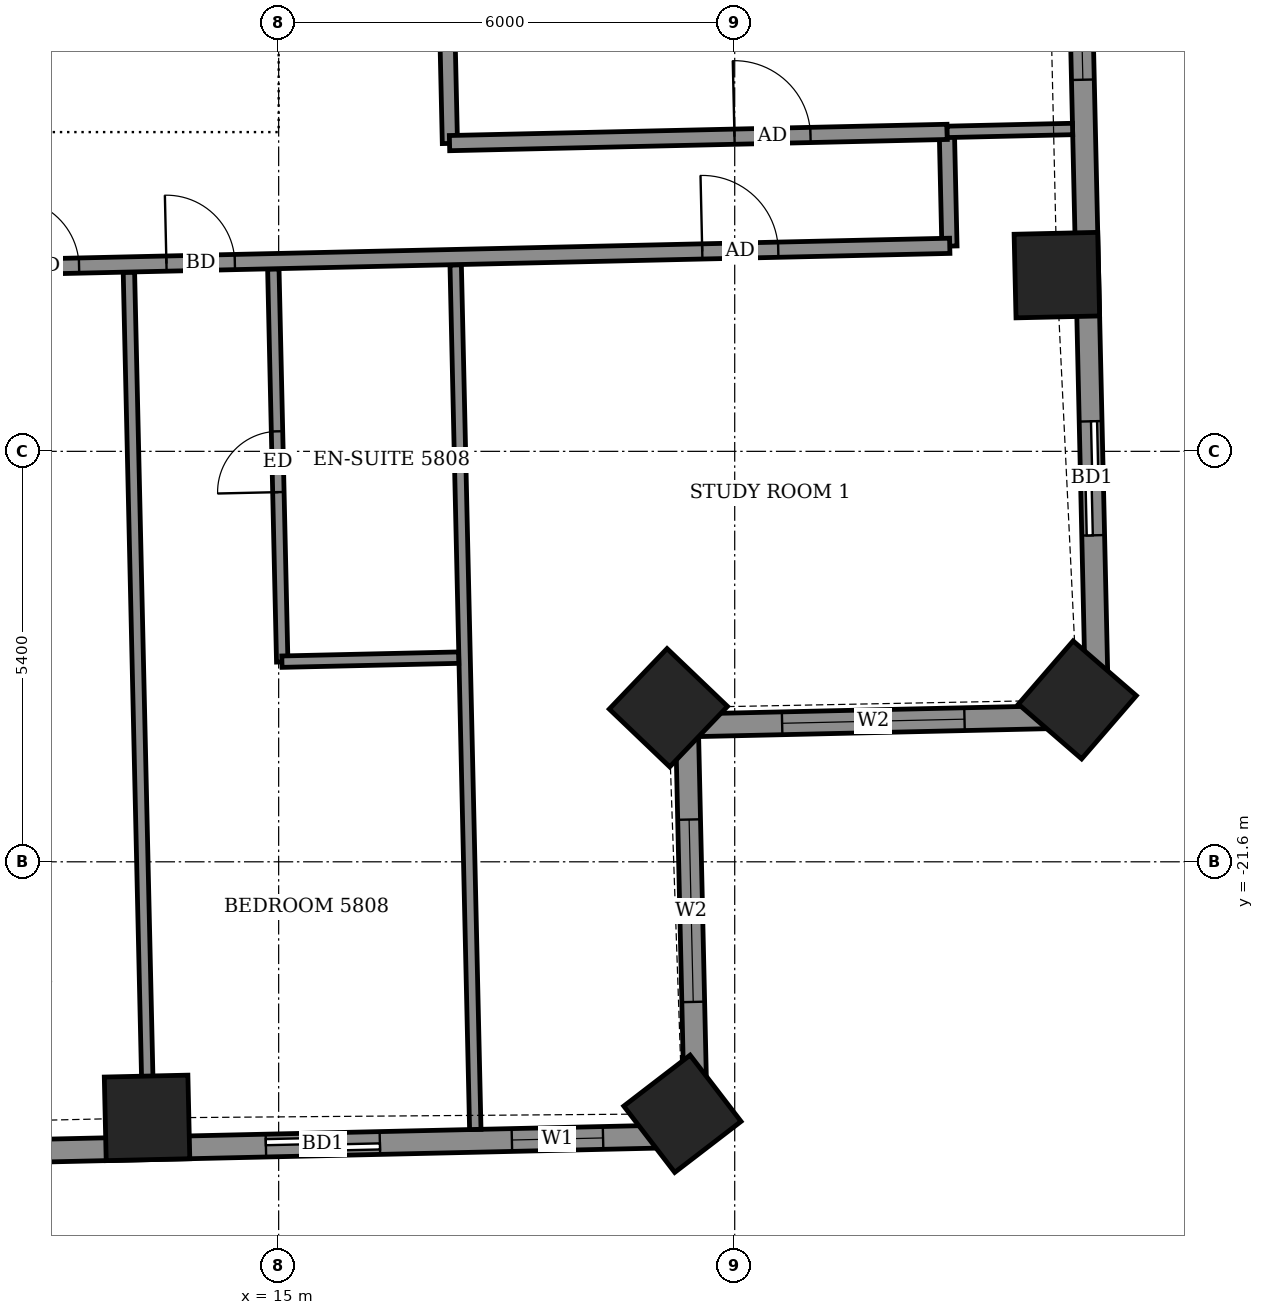
"""IFC4 building model, lengths in metres.
Left out: names, types, materials, properties, quantities, classifications, styles, units other than length and angle.
Written with IfcOpenShell. Run it as: python <this file> out.ifc"""

import sys

from ifc_helpers import new_model, si_unit, direction, frame, frame_2d, origin, origin_2d, place, context, subcontext, project, spatial, rectangle, extrude, element, fill, save


model = new_model("IFC4")
c1 = context("Model", 3, precision=1e-05, world=origin(), true_north=direction((0.0, 1.0)))
c2 = subcontext(c1, "Body", "Model", "MODEL_VIEW")
j1 = project(units=[si_unit("LENGTHUNIT", "METRE"), si_unit("PLANEANGLEUNIT", "RADIAN")], contexts=[c1])
p1 = place(None, origin())
s1 = spatial("IfcSite", under=j1, at=p1, CompositionType="ELEMENT")
p2 = place(p1, origin())
s2 = spatial("IfcBuilding", under=s1, at=p2, CompositionType="ELEMENT")
p3 = place(p2, frame((0.0, 0.0, 231.1)))
s3 = spatial("IfcBuildingStorey", under=s2, at=p3, CompositionType="ELEMENT", Elevation=231.1)
for number, where, z_axis, x_axis in (
    (1, (13.269, -24.969, -0.55), (0.0, 0.0, 1.0), (1.0, 0.023, 0.0)),
    (2, (20.312, -24.915, -0.55), (0.0, 0.0, 1.0), (0.793, 0.609, 0.0)),
    (3, (20.127, -19.573, -0.55), (0.0, 0.0, 1.0), (0.691, 0.723, 0.0)),
    (4, (25.508, -19.47, -0.55), (0.0, 0.0, 1.0), (0.654, 0.756, 0.0)),
    (5, (25.238, -13.882, -0.55), (0.0, 0.0, 1.0), (-0.023, 1.0, 0.0)),
):
    element("IfcColumn", number, at=place(p3, frame(where, z_axis=z_axis, x_axis=x_axis)), inside=s3, PredefinedType="COLUMN", context=c2, shape_type="SweptSolid", body=[
        extrude(rectangle(XDim=1.1, YDim=1.1, at=origin_2d()), origin(), (0.0, 0.0, 1.0), 3.6),
    ])
p4 = place(p3, frame((25.77, -19.684, 0.0), z_axis=(0.0, 0.0, 1.0), x_axis=(-0.022642656789, 0.999743622182, 0.0)))
e6 = element("IfcWall", 6, at=p4, inside=s3, PredefinedType="SOLIDWALL", context=c2, shape_type="SweptSolid", body=[
    extrude(rectangle(XDim=12.324, YDim=0.3, at=frame_2d((6.162, 0.0))), origin(), (0.0, 0.0, 1.0), 2.55),
])
p5 = place(p4, frame((2.38, 0.0, 0.0)))
e7 = element("IfcOpeningElement", 7, at=p5, cuts=e6, PredefinedType="OPENING", context=c2, shape_type="SweptSolid", body=[
    extrude(rectangle(XDim=1.5, YDim=2.4, at=frame_2d((0.75, 1.2))), frame((0.0, 0.16, 0.0), z_axis=(0.0, -1.0, 0.0), x_axis=(1.0, 0.0, 0.0)), (0.0, 0.0, 1.0), 0.32),
])
p6 = place(p4, frame((8.375, 0.0, 0.9)))
e8 = element("IfcOpeningElement", 8, at=p6, cuts=e6, PredefinedType="OPENING", context=c2, shape_type="SweptSolid", body=[
    extrude(rectangle(XDim=2.4, YDim=1.5, at=frame_2d((1.2, 0.75))), frame((0.0, 0.16, 0.0), z_axis=(0.0, -1.0, 0.0), x_axis=(1.0, 0.0, 0.0)), (0.0, 0.0, 1.0), 0.32),
])
p7 = place(p3, frame((-23.403, -26.201, 0.0), z_axis=(0.0, 0.0, 1.0), x_axis=(0.999742770494, 0.022680230258, 0.0)))
e9 = element("IfcWall", 9, at=p7, inside=s3, PredefinedType="SOLIDWALL", context=c2, shape_type="SweptSolid", body=[
    extrude(rectangle(XDim=43.908, YDim=0.3, at=frame_2d((21.954, 0.0))), origin(), (0.0, 0.0, 1.0), 2.55),
])
p8 = place(p7, frame((2.124, 0.0, 0.0)))
e10 = element("IfcOpeningElement", 10, at=p8, cuts=e9, PredefinedType="OPENING", context=c2, shape_type="SweptSolid", body=[
    extrude(rectangle(XDim=1.5, YDim=2.4, at=frame_2d((0.75, 1.2))), frame((0.0, 0.16, 0.0), z_axis=(0.0, -1.0, 0.0), x_axis=(1.0, 0.0, 0.0)), (0.0, 0.0, 1.0), 0.32),
])
p9 = place(p7, frame((8.009, 0.0, 0.0)))
e11 = element("IfcOpeningElement", 11, at=p9, cuts=e9, PredefinedType="OPENING", context=c2, shape_type="SweptSolid", body=[
    extrude(rectangle(XDim=1.2, YDim=2.4, at=frame_2d((0.6, 1.2))), frame((0.0, 0.16, 0.0), z_axis=(0.0, -1.0, 0.0), x_axis=(1.0, 0.0, 0.0)), (0.0, 0.0, 1.0), 0.32),
])
p10 = place(p7, frame((11.225, 0.0, 0.0)))
e12 = element("IfcOpeningElement", 12, at=p10, cuts=e9, PredefinedType="OPENING", context=c2, shape_type="SweptSolid", body=[
    extrude(rectangle(XDim=1.5, YDim=2.4, at=frame_2d((0.75, 1.2))), frame((0.0, 0.16, 0.0), z_axis=(0.0, -1.0, 0.0), x_axis=(1.0, 0.0, 0.0)), (0.0, 0.0, 1.0), 0.32),
])
p11 = place(p7, frame((16.093, 0.0, 0.0)))
e13 = element("IfcOpeningElement", 13, at=p11, cuts=e9, PredefinedType="OPENING", context=c2, shape_type="SweptSolid", body=[
    extrude(rectangle(XDim=1.5, YDim=2.4, at=frame_2d((0.75, 1.2))), frame((0.0, 0.16, 0.0), z_axis=(0.0, -1.0, 0.0), x_axis=(1.0, 0.0, 0.0)), (0.0, 0.0, 1.0), 0.32),
])
p12 = place(p7, frame((19.477, 0.0, 0.0)))
e14 = element("IfcOpeningElement", 14, at=p12, cuts=e9, PredefinedType="OPENING", context=c2, shape_type="SweptSolid", body=[
    extrude(rectangle(XDim=1.5, YDim=2.4, at=frame_2d((0.75, 1.2))), frame((0.0, 0.16, 0.0), z_axis=(0.0, -1.0, 0.0), x_axis=(1.0, 0.0, 0.0)), (0.0, 0.0, 1.0), 0.32),
])
p13 = place(p7, frame((24.8, 0.0, 0.0)))
e15 = element("IfcOpeningElement", 15, at=p13, cuts=e9, PredefinedType="OPENING", context=c2, shape_type="SweptSolid", body=[
    extrude(rectangle(XDim=1.5, YDim=2.4, at=frame_2d((0.75, 1.2))), frame((0.0, 0.16, 0.0), z_axis=(0.0, -1.0, 0.0), x_axis=(1.0, 0.0, 0.0)), (0.0, 0.0, 1.0), 0.32),
])
p14 = place(p7, frame((30.111, 0.0, 0.0)))
e16 = element("IfcOpeningElement", 16, at=p14, cuts=e9, PredefinedType="OPENING", context=c2, shape_type="SweptSolid", body=[
    extrude(rectangle(XDim=1.5, YDim=2.4, at=frame_2d((0.75, 1.2))), frame((0.0, 0.16, 0.0), z_axis=(0.0, -1.0, 0.0), x_axis=(1.0, 0.0, 0.0)), (0.0, 0.0, 1.0), 0.32),
])
p15 = place(p7, frame((33.495, 0.0, 0.0)))
e17 = element("IfcOpeningElement", 17, at=p15, cuts=e9, PredefinedType="OPENING", context=c2, shape_type="SweptSolid", body=[
    extrude(rectangle(XDim=1.5, YDim=2.4, at=frame_2d((0.75, 1.2))), frame((0.0, 0.16, 0.0), z_axis=(0.0, -1.0, 0.0), x_axis=(1.0, 0.0, 0.0)), (0.0, 0.0, 1.0), 0.32),
])
p16 = place(p7, frame((38.245, 0.0, 0.0)))
e18 = element("IfcOpeningElement", 18, at=p16, cuts=e9, PredefinedType="OPENING", context=c2, shape_type="SweptSolid", body=[
    extrude(rectangle(XDim=1.5, YDim=2.4, at=frame_2d((0.75, 1.2))), frame((0.0, 0.16, 0.0), z_axis=(0.0, -1.0, 0.0), x_axis=(1.0, 0.0, 0.0)), (0.0, 0.0, 1.0), 0.32),
])
p17 = place(p7, frame((41.482, 0.0, 0.9)))
e19 = element("IfcOpeningElement", 19, at=p17, cuts=e9, PredefinedType="OPENING", context=c2, shape_type="SweptSolid", body=[
    extrude(rectangle(XDim=1.2, YDim=1.5, at=frame_2d((0.6, 0.75))), frame((0.0, 0.16, 0.0), z_axis=(0.0, -1.0, 0.0), x_axis=(1.0, 0.0, 0.0)), (0.0, 0.0, 1.0), 0.32),
])
p18 = place(p3, frame((20.494, -25.205, 0.0), z_axis=(0.0, 0.0, 1.0), x_axis=(-0.022558128916, 0.999745533033, 0.0)))
e20 = element("IfcWall", 20, at=p18, inside=s3, PredefinedType="SOLIDWALL", context=c2, shape_type="SweptSolid", body=[
    extrude(rectangle(XDim=5.401, YDim=0.3, at=frame_2d((2.7, 0.0))), origin(), (0.0, 0.0, 1.0), 2.55),
])
p19 = place(p18, frame((1.762, 0.0, 0.9)))
e21 = element("IfcOpeningElement", 21, at=p19, cuts=e20, PredefinedType="OPENING", context=c2, shape_type="SweptSolid", body=[
    extrude(rectangle(XDim=2.4, YDim=1.5, at=frame_2d((1.2, 0.75))), frame((0.0, 0.16, 0.0), z_axis=(0.0, -1.0, 0.0), x_axis=(1.0, 0.0, 0.0)), (0.0, 0.0, 1.0), 0.32),
])
p20 = place(p3, frame((20.372, -19.806, 0.0), z_axis=(0.0, 0.0, 1.0), x_axis=(0.999745417973, 0.02256322766, 0.0)))
e22 = element("IfcWall", 22, at=p20, inside=s3, PredefinedType="SOLIDWALL", context=c2, shape_type="SweptSolid", body=[
    extrude(rectangle(XDim=5.399, YDim=0.3, at=frame_2d((2.7, 0.0))), origin(), (0.0, 0.0, 1.0), 2.55),
])
p21 = place(p20, frame((1.252, 0.0, 0.9)))
e23 = element("IfcOpeningElement", 23, at=p21, cuts=e22, PredefinedType="OPENING", context=c2, shape_type="SweptSolid", body=[
    extrude(rectangle(XDim=2.4, YDim=1.5, at=frame_2d((1.2, 0.75))), frame((0.0, 0.16, 0.0), z_axis=(0.0, -1.0, 0.0), x_axis=(1.0, 0.0, 0.0)), (0.0, 0.0, 1.0), 0.32),
])
p22 = place(p3, frame((13.289, -25.218, 0.0), z_axis=(0.0, 0.0, 1.0), x_axis=(-0.022770155219, 0.999740726404, 0.0)))
e24 = element("IfcWall", 24, at=p22, inside=s3, PredefinedType="PARTITIONING", context=c2, shape_type="SweptSolid", body=[
    extrude(rectangle(XDim=11.376, YDim=0.15, at=frame_2d((5.688, 0.0))), origin(), (0.0, 0.0, 1.0), 3.05),
])
p23 = place(p3, frame((17.587, -25.121, 0.0), z_axis=(0.0, 0.0, 1.0), x_axis=(-0.022662905301, 0.999743163379, 0.0)))
e25 = element("IfcWall", 25, at=p23, inside=s3, PredefinedType="PARTITIONING", context=c2, shape_type="SweptSolid", body=[
    extrude(rectangle(XDim=11.376, YDim=0.15, at=frame_2d((5.688, 0.0))), origin(), (0.0, 0.0, 1.0), 2.55),
])
p24 = place(p3, frame((15.047, -18.971, 0.0), z_axis=(0.0, 0.0, 1.0), x_axis=(-0.022665628603, 0.999743101642, 0.0)))
e26 = element("IfcWall", 26, at=p24, inside=s3, PredefinedType="PARTITIONING", context=c2, shape_type="SweptSolid", body=[
    extrude(rectangle(XDim=5.17, YDim=0.15, at=frame_2d((2.585, 0.0))), origin(), (0.0, 0.0, 1.0), 3.05),
])
p25 = place(p24, frame((2.235, 0.0, 0.0)))
e27 = element("IfcOpeningElement", 27, at=p25, cuts=e26, PredefinedType="OPENING", context=c2, shape_type="SweptSolid", body=[
    extrude(rectangle(XDim=0.8, YDim=2.1, at=frame_2d((0.4, 1.05))), frame((0.0, 0.085, 0.0), z_axis=(0.0, -1.0, 0.0), x_axis=(1.0, 0.0, 0.0)), (0.0, 0.0, 1.0), 0.17),
])
p26 = place(p3, frame((15.043, -18.967, 0.0), z_axis=(0.0, 0.0, 1.0), x_axis=(0.999740478815, 0.022781023197, 0.0)))
e28 = element("IfcWall", 28, at=p26, inside=s3, PredefinedType="PARTITIONING", context=c2, shape_type="SweptSolid", body=[
    extrude(rectangle(XDim=2.325, YDim=0.15, at=frame_2d((1.163, 0.0))), origin(), (0.0, 0.0, 1.0), 3.05),
])
p27 = place(p3, frame((23.825, -13.5, 0.0), z_axis=(0.0, 0.0, 1.0), x_axis=(-0.022632637625, 0.99974384905, 0.0)))
e29 = element("IfcWall", 29, at=p27, inside=s3, PredefinedType="PARTITIONING", context=c2, shape_type="SweptSolid", body=[
    extrude(rectangle(XDim=1.5, YDim=0.2, at=frame_2d((0.75, 0.0))), origin(), (0.0, 0.0, 1.0), 3.05),
])
p28 = place(p3, frame((-27.016, -14.65, 0.0), z_axis=(0.0, 0.0, 1.0), x_axis=(0.999742623033, 0.022686729391, 0.0)))
e30 = element("IfcWall", 30, at=p28, inside=s3, PredefinedType="PARTITIONING", context=c2, shape_type="SweptSolid", body=[
    extrude(rectangle(XDim=50.858, YDim=0.2, at=frame_2d((25.429, 0.0))), origin(), (0.0, 0.0, 1.0), 3.05),
])
p29 = place(p28, frame((1.625, 0.0, 0.0)))
e31 = element("IfcOpeningElement", 31, at=p29, cuts=e30, PredefinedType="OPENING", context=c2, shape_type="SweptSolid", body=[
    extrude(rectangle(XDim=1.0, YDim=2.1, at=frame_2d((0.5, 1.05))), frame((0.0, 0.11, 0.0), z_axis=(0.0, -1.0, 0.0), x_axis=(1.0, 0.0, 0.0)), (0.0, 0.0, 1.0), 0.22),
])
p30 = place(p28, frame((6.6, 0.0, 0.0)))
e32 = element("IfcOpeningElement", 32, at=p30, cuts=e30, PredefinedType="OPENING", context=c2, shape_type="SweptSolid", body=[
    extrude(rectangle(XDim=0.9, YDim=2.1, at=frame_2d((0.45, 1.05))), frame((0.0, 0.11, 0.0), z_axis=(0.0, -1.0, 0.0), x_axis=(1.0, 0.0, 0.0)), (0.0, 0.0, 1.0), 0.22),
])
p31 = place(p28, frame((11.5, 0.0, 0.0)))
e33 = element("IfcOpeningElement", 33, at=p31, cuts=e30, PredefinedType="OPENING", context=c2, shape_type="SweptSolid", body=[
    extrude(rectangle(XDim=0.9, YDim=2.1, at=frame_2d((0.45, 1.05))), frame((0.0, 0.11, 0.0), z_axis=(0.0, -1.0, 0.0), x_axis=(1.0, 0.0, 0.0)), (0.0, 0.0, 1.0), 0.22),
])
p32 = place(p28, frame((13.675, 0.0, 0.0)))
e34 = element("IfcOpeningElement", 34, at=p32, cuts=e30, PredefinedType="OPENING", context=c2, shape_type="SweptSolid", body=[
    extrude(rectangle(XDim=0.9, YDim=2.1, at=frame_2d((0.45, 1.05))), frame((0.0, 0.11, 0.0), z_axis=(0.0, -1.0, 0.0), x_axis=(1.0, 0.0, 0.0)), (0.0, 0.0, 1.0), 0.22),
])
p33 = place(p28, frame((20.625, 0.0, 0.0)))
e35 = element("IfcOpeningElement", 35, at=p33, cuts=e30, PredefinedType="OPENING", context=c2, shape_type="SweptSolid", body=[
    extrude(rectangle(XDim=0.9, YDim=2.1, at=frame_2d((0.45, 1.05))), frame((0.0, 0.11, 0.0), z_axis=(0.0, -1.0, 0.0), x_axis=(1.0, 0.0, 0.0)), (0.0, 0.0, 1.0), 0.22),
])
p34 = place(p28, frame((22.775, 0.0, 0.0)))
e36 = element("IfcOpeningElement", 36, at=p34, cuts=e30, PredefinedType="OPENING", context=c2, shape_type="SweptSolid", body=[
    extrude(rectangle(XDim=0.9, YDim=2.1, at=frame_2d((0.45, 1.05))), frame((0.0, 0.11, 0.0), z_axis=(0.0, -1.0, 0.0), x_axis=(1.0, 0.0, 0.0)), (0.0, 0.0, 1.0), 0.22),
])
p35 = place(p28, frame((29.65, 0.0, 0.0)))
e37 = element("IfcOpeningElement", 37, at=p35, cuts=e30, PredefinedType="OPENING", context=c2, shape_type="SweptSolid", body=[
    extrude(rectangle(XDim=0.9, YDim=2.1, at=frame_2d((0.45, 1.05))), frame((0.0, 0.11, 0.0), z_axis=(0.0, -1.0, 0.0), x_axis=(1.0, 0.0, 0.0)), (0.0, 0.0, 1.0), 0.22),
])
p36 = place(p28, frame((31.625, 0.0, 0.0)))
e38 = element("IfcOpeningElement", 38, at=p36, cuts=e30, PredefinedType="OPENING", context=c2, shape_type="SweptSolid", body=[
    extrude(rectangle(XDim=0.9, YDim=2.1, at=frame_2d((0.45, 1.05))), frame((0.0, 0.11, 0.0), z_axis=(0.0, -1.0, 0.0), x_axis=(1.0, 0.0, 0.0)), (0.0, 0.0, 1.0), 0.22),
])
p37 = place(p28, frame((38.5, 0.0, 0.0)))
e39 = element("IfcOpeningElement", 39, at=p37, cuts=e30, PredefinedType="OPENING", context=c2, shape_type="SweptSolid", body=[
    extrude(rectangle(XDim=0.9, YDim=2.1, at=frame_2d((0.45, 1.05))), frame((0.0, 0.11, 0.0), z_axis=(0.0, -1.0, 0.0), x_axis=(1.0, 0.0, 0.0)), (0.0, 0.0, 1.0), 0.22),
])
p38 = place(p28, frame((40.55, 0.0, 0.0)))
e40 = element("IfcOpeningElement", 40, at=p38, cuts=e30, PredefinedType="OPENING", context=c2, shape_type="SweptSolid", body=[
    extrude(rectangle(XDim=0.9, YDim=2.1, at=frame_2d((0.45, 1.05))), frame((0.0, 0.11, 0.0), z_axis=(0.0, -1.0, 0.0), x_axis=(1.0, 0.0, 0.0)), (0.0, 0.0, 1.0), 0.22),
])
p39 = place(p28, frame((47.601, 0.0, 0.0)))
e41 = element("IfcOpeningElement", 41, at=p39, cuts=e30, PredefinedType="OPENING", context=c2, shape_type="SweptSolid", body=[
    extrude(rectangle(XDim=1.0, YDim=2.1, at=frame_2d((0.5, 1.05))), frame((0.0, 0.11, 0.0), z_axis=(0.0, -1.0, 0.0), x_axis=(1.0, 0.0, 0.0)), (0.0, 0.0, 1.0), 0.22),
])
p40 = place(p3, frame((17.253, -12.149, 0.0), z_axis=(0.0, 0.0, 1.0), x_axis=(-0.022578158225, 0.999745080894, 0.0)))
e42 = element("IfcWall", 42, at=p40, inside=s3, PredefinedType="PARTITIONING", context=c2, shape_type="SweptSolid", body=[
    extrude(rectangle(XDim=4.336, YDim=0.2, at=frame_2d((2.168, 0.0))), origin(), (0.0, 0.0, 1.0), 3.05),
])
p41 = place(p3, frame((17.248, -12.145, 0.0), z_axis=(0.0, 0.0, 1.0), x_axis=(0.999744752818, 0.022592680497, 0.0)))
e43 = element("IfcWall", 43, at=p41, inside=s3, PredefinedType="PARTITIONING", context=c2, shape_type="SweptSolid", body=[
    extrude(rectangle(XDim=6.549, YDim=0.2, at=frame_2d((3.274, 0.0))), origin(), (0.0, 0.0, 1.0), 3.05),
])
p42 = place(p41, frame((3.75, 0.0, 0.0)))
e44 = element("IfcOpeningElement", 44, at=p42, cuts=e43, PredefinedType="OPENING", context=c2, shape_type="SweptSolid", body=[
    extrude(rectangle(XDim=1.0, YDim=2.1, at=frame_2d((0.5, 1.05))), frame((0.0, 0.11, 0.0), z_axis=(0.0, -1.0, 0.0), x_axis=(1.0, 0.0, 0.0)), (0.0, 0.0, 1.0), 0.22),
])
p43 = place(p3, frame((23.795, -11.997, 0.0), z_axis=(0.0, 0.0, 1.0), x_axis=(0.999733755381, 0.023074192312, 0.0)))
e45 = element("IfcWall", 45, at=p43, inside=s3, PredefinedType="PARTITIONING", context=c2, shape_type="SweptSolid", body=[
    extrude(rectangle(XDim=1.651, YDim=0.15, at=frame_2d((0.825, 0.0))), origin(), (0.0, 0.0, 1.0), 2.55),
])
p44 = place(p3, frame((-14.6, -11.2, 0.0), z_axis=(0.0, 0.0, 1.0), x_axis=(1.0, 0.0, 0.0)))
e46 = element("IfcWall", 46, at=p44, inside=s3, PredefinedType="SHEAR", context=c2, shape_type="SweptSolid", body=[
    extrude(rectangle(XDim=29.2, YDim=0.8, at=frame_2d((14.6, 0.0))), origin(), (0.0, 0.0, 1.0), 3.6),
])
p45 = place(p5, origin())
e47 = element("IfcDoor", 47, at=p45, inside=s3, OperationType="SLIDING_TO_LEFT", PredefinedType="DOOR", context=c2, shape_type="SweptSolid", body=[
    extrude(rectangle(XDim=1.5, YDim=2.4, at=frame_2d((0.75, 1.2))), frame((0.0, 0.025, 0.0), z_axis=(0.0, -1.0, 0.0), x_axis=(1.0, 0.0, 0.0)), (0.0, 0.0, 1.0), 0.05),
])
fill(e7, e47)
p46 = place(p6, origin())
e48 = element("IfcWindow", 48, at=p46, inside=s3, PartitioningType="DOUBLE_PANEL_VERTICAL", PredefinedType="WINDOW", context=c2, shape_type="SweptSolid", body=[
    extrude(rectangle(XDim=2.4, YDim=1.5, at=frame_2d((1.2, 0.75))), frame((0.0, 0.03, 0.0), z_axis=(0.0, -1.0, 0.0), x_axis=(1.0, 0.0, 0.0)), (0.0, 0.0, 1.0), 0.06),
])
fill(e8, e48)
p47 = place(p16, origin())
e49 = element("IfcDoor", 49, at=p47, inside=s3, OperationType="SLIDING_TO_LEFT", PredefinedType="DOOR", context=c2, shape_type="SweptSolid", body=[
    extrude(rectangle(XDim=1.5, YDim=2.4, at=frame_2d((0.75, 1.2))), frame((0.0, 0.025, 0.0), z_axis=(0.0, -1.0, 0.0), x_axis=(1.0, 0.0, 0.0)), (0.0, 0.0, 1.0), 0.05),
])
fill(e18, e49)
p48 = place(p17, origin())
e50 = element("IfcWindow", 50, at=p48, inside=s3, PartitioningType="SINGLE_PANEL", PredefinedType="WINDOW", context=c2, shape_type="SweptSolid", body=[
    extrude(rectangle(XDim=1.2, YDim=1.5, at=frame_2d((0.6, 0.75))), frame((0.0, 0.03, 0.0), z_axis=(0.0, -1.0, 0.0), x_axis=(1.0, 0.0, 0.0)), (0.0, 0.0, 1.0), 0.06),
])
fill(e19, e50)
p49 = place(p19, origin())
e51 = element("IfcWindow", 51, at=p49, inside=s3, PartitioningType="DOUBLE_PANEL_VERTICAL", PredefinedType="WINDOW", context=c2, shape_type="SweptSolid", body=[
    extrude(rectangle(XDim=2.4, YDim=1.5, at=frame_2d((1.2, 0.75))), frame((0.0, 0.03, 0.0), z_axis=(0.0, -1.0, 0.0), x_axis=(1.0, 0.0, 0.0)), (0.0, 0.0, 1.0), 0.06),
])
fill(e21, e51)
p50 = place(p21, origin())
e52 = element("IfcWindow", 52, at=p50, inside=s3, PartitioningType="DOUBLE_PANEL_VERTICAL", PredefinedType="WINDOW", context=c2, shape_type="SweptSolid", body=[
    extrude(rectangle(XDim=2.4, YDim=1.5, at=frame_2d((1.2, 0.75))), frame((0.0, 0.03, 0.0), z_axis=(0.0, -1.0, 0.0), x_axis=(1.0, 0.0, 0.0)), (0.0, 0.0, 1.0), 0.06),
])
fill(e23, e52)
p51 = place(p37, origin())
e53 = element("IfcDoor", 53, at=p51, inside=s3, OperationType="SINGLE_SWING_LEFT", PredefinedType="DOOR", context=c2, shape_type="SweptSolid", body=[
    extrude(rectangle(XDim=0.9, YDim=2.1, at=frame_2d((0.45, 1.05))), frame((0.0, 0.025, 0.0), z_axis=(0.0, -1.0, 0.0), x_axis=(1.0, 0.0, 0.0)), (0.0, 0.0, 1.0), 0.05),
])
fill(e39, e53)
p52 = place(p38, origin())
e54 = element("IfcDoor", 54, at=p52, inside=s3, OperationType="SINGLE_SWING_RIGHT", PredefinedType="DOOR", context=c2, shape_type="SweptSolid", body=[
    extrude(rectangle(XDim=0.9, YDim=2.1, at=frame_2d((0.45, 1.05))), frame((0.0, 0.025, 0.0), z_axis=(0.0, -1.0, 0.0), x_axis=(1.0, 0.0, 0.0)), (0.0, 0.0, 1.0), 0.05),
])
fill(e40, e54)
p53 = place(p25, origin())
e55 = element("IfcDoor", 55, at=p53, inside=s3, OperationType="SINGLE_SWING_RIGHT", PredefinedType="DOOR", context=c2, shape_type="SweptSolid", body=[
    extrude(rectangle(XDim=0.8, YDim=2.1, at=frame_2d((0.4, 1.05))), frame((0.0, 0.025, 0.0), z_axis=(0.0, -1.0, 0.0), x_axis=(1.0, 0.0, 0.0)), (0.0, 0.0, 1.0), 0.05),
])
fill(e27, e55)
p54 = place(p39, origin())
e56 = element("IfcDoor", 56, at=p54, inside=s3, OperationType="SINGLE_SWING_RIGHT", PredefinedType="DOOR", context=c2, shape_type="SweptSolid", body=[
    extrude(rectangle(XDim=1.0, YDim=2.1, at=frame_2d((0.5, 1.05))), frame((0.0, 0.025, 0.0), z_axis=(0.0, -1.0, 0.0), x_axis=(1.0, 0.0, 0.0)), (0.0, 0.0, 1.0), 0.05),
])
fill(e41, e56)
p55 = place(p42, origin())
e57 = element("IfcDoor", 57, at=p55, inside=s3, OperationType="SINGLE_SWING_LEFT", PredefinedType="DOOR", context=c2, shape_type="SweptSolid", body=[
    extrude(rectangle(XDim=1.0, YDim=2.1, at=frame_2d((0.5, 1.05))), frame((0.0, 0.025, 0.0), z_axis=(0.0, -1.0, 0.0), x_axis=(1.0, 0.0, 0.0)), (0.0, 0.0, 1.0), 0.05),
])
fill(e44, e57)
save(model, sys.argv[1])
